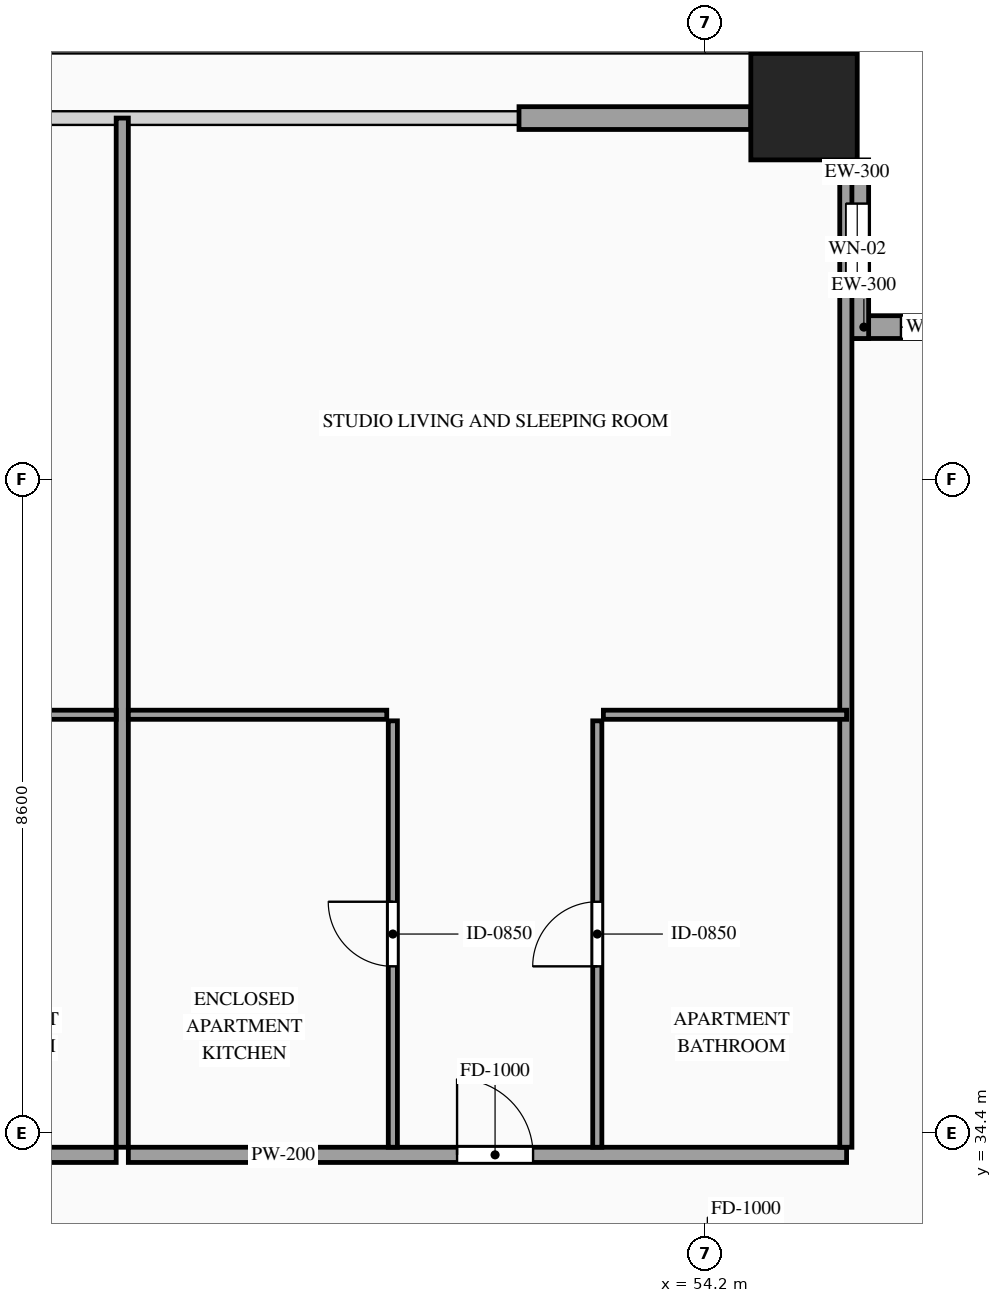
"""IFC4 building model, lengths in metres.
Left out: names, types, materials, properties, quantities, classifications, styles, units other than length and angle.
Written with IfcOpenShell. Run it as: python <this file> out.ifc"""

import sys

from ifc_helpers import new_model, si_unit, direction, frame, frame_2d, origin, origin_2d, place, context, subcontext, project, spatial, rectangle, hollow_rectangle, extrude, source, transform, mapped, element, fill, save


model = new_model("IFC4")
c1 = context("Model", 3, precision=1e-05, world=origin(), true_north=direction((0.0, 1.0)))
c2 = subcontext(c1, "Body", "Model", "MODEL_VIEW")
j1 = project(units=[si_unit("LENGTHUNIT", "METRE"), si_unit("PLANEANGLEUNIT", "RADIAN")], contexts=[c1])
p1 = place(None, origin())
s1 = spatial("IfcSite", under=j1, at=p1, CompositionType="ELEMENT")
p2 = place(p1, origin())
s2 = spatial("IfcBuilding", under=s1, at=p2, CompositionType="ELEMENT")
p3 = place(p2, frame((0.0, 0.0, 188.0)))
s3 = spatial("IfcBuildingStorey", under=s2, at=p3, CompositionType="ELEMENT", Elevation=188.0)
m1 = source(origin(), c2, "Body", "SweptSolid", [
    extrude(hollow_rectangle(XDim=1.4, YDim=1.4, WallThickness=0.06, at=origin_2d()), origin(), (0.0, 0.0, 1.0), 3.5),
])
p4 = place(p3, frame((55.5, 47.9, 0.0), z_axis=(0.0, 0.0, 1.0), x_axis=(1.0, 0.0, 0.0)))
e1 = element("IfcColumn", 1, at=p4, inside=s3, PredefinedType="COLUMN", context=c2, shape_type="MappedRepresentation", body=[
    mapped(m1, transform((0.0, 0.0, 0.0), scale=1.0)),
])
p5 = place(p3, frame((58.4, 45.0, 0.0), z_axis=(0.0, 0.0, 1.0), x_axis=(-1.0, 0.0, 0.0)))
e2 = element("IfcWall", 2, at=p5, inside=s3, PredefinedType="SOLIDWALL", context=c2, shape_type="SweptSolid", body=[
    extrude(rectangle(XDim=2.35, YDim=0.3, at=frame_2d((1.175, 0.0))), origin(), (0.0, 0.0, 1.0), 3.28),
])
p6 = place(p5, frame((0.725, 0.0, 0.85)))
e3 = element("IfcOpeningElement", 3, at=p6, cuts=e2, PredefinedType="OPENING", context=c2, shape_type="SweptSolid", body=[
    extrude(rectangle(XDim=0.9, YDim=1.5, at=frame_2d((0.45, 0.75))), frame((0.0, 0.165, 0.0), z_axis=(0.0, -1.0, 0.0), x_axis=(1.0, 0.0, 0.0)), (0.0, 0.0, 1.0), 0.33),
])
p7 = place(p3, frame((56.2, 44.85, 0.0), z_axis=(0.0, 0.0, 1.0), x_axis=(0.0, 1.0, 0.0)))
e4 = element("IfcWall", 4, at=p7, inside=s3, PredefinedType="SOLIDWALL", context=c2, shape_type="SweptSolid", body=[
    extrude(rectangle(XDim=2.35, YDim=0.3, at=frame_2d((1.175, 0.0))), origin(), (0.0, 0.0, 1.0), 3.28),
])
p8 = place(p7, frame((0.575, 0.0, 0.85)))
e5 = element("IfcOpeningElement", 5, at=p8, cuts=e4, PredefinedType="OPENING", context=c2, shape_type="SweptSolid", body=[
    extrude(rectangle(XDim=1.2, YDim=2.1, at=frame_2d((0.6, 1.05))), frame((0.0, 0.165, 0.0), z_axis=(0.0, -1.0, 0.0), x_axis=(1.0, 0.0, 0.0)), (0.0, 0.0, 1.0), 0.33),
])
m2 = source(origin(), c2, "Body", "SweptSolid", [
    extrude(rectangle(XDim=3.05, YDim=0.3, at=frame_2d((1.525, 0.0))), origin(), (0.0, 0.0, 1.0), 2.835),
])
p9 = place(p3, frame((51.75, 47.75, 0.0), z_axis=(0.0, 0.0, 1.0), x_axis=(1.0, 0.0, 0.0)))
e6 = element("IfcWall", 6, at=p9, inside=s3, PredefinedType="SOLIDWALL", context=c2, shape_type="MappedRepresentation", body=[
    mapped(m2, transform((0.0, 0.0, 0.0), scale=1.0)),
])
p10 = place(p3, frame((37.08, 34.11, 0.0), z_axis=(0.0, 0.0, 1.0), x_axis=(1.0, 0.0, 0.0)))
e7 = element("IfcWall", 7, at=p10, inside=s3, PredefinedType="PARTITIONING", context=c2, shape_type="SweptSolid", body=[
    extrude(rectangle(XDim=9.37, YDim=0.2, at=frame_2d((4.685, 0.0))), origin(), (0.0, 0.0, 1.0), 3.28),
])
p11 = place(p10, frame((4.282, 0.0, 0.0)))
e8 = element("IfcOpeningElement", 8, at=p11, cuts=e7, PredefinedType="OPENING", context=c2, shape_type="SweptSolid", body=[
    extrude(rectangle(XDim=1.0, YDim=2.2, at=frame_2d((0.5, 1.1))), frame((0.0, 0.115, 0.0), z_axis=(0.0, -1.0, 0.0), x_axis=(1.0, 0.0, 0.0)), (0.0, 0.0, 1.0), 0.23),
])
m3 = source(origin(), c2, "Body", "SweptSolid", [
    extrude(rectangle(XDim=13.54, YDim=0.16, at=frame_2d((6.77, 0.0))), origin(), (0.0, 0.0, 1.0), 3.28),
])
p12 = place(p3, frame((46.53, 34.21, 0.0), z_axis=(0.0, 0.0, 1.0), x_axis=(0.0, 1.0, 0.0)))
e9 = element("IfcWall", 9, at=p12, inside=s3, PredefinedType="PARTITIONING", context=c2, shape_type="MappedRepresentation", body=[
    mapped(m3, transform((0.0, 0.0, 0.0), scale=1.0)),
])
m4 = source(origin(), c2, "Body", "SweptSolid", [
    extrude(rectangle(XDim=3.2, YDim=0.12, at=frame_2d((1.6, 0.0))), origin(), (0.0, 0.0, 1.0), 2.875),
])
p13 = place(p3, frame((43.25, 39.9, 0.0), z_axis=(0.0, 0.0, 1.0), x_axis=(1.0, 0.0, 0.0)))
e10 = element("IfcWall", 10, at=p13, inside=s3, PredefinedType="PARTITIONING", context=c2, shape_type="MappedRepresentation", body=[
    mapped(m4, transform((0.0, 0.0, 0.0), scale=1.0)),
])
p14 = place(p3, frame((46.61, 34.11, 0.0), z_axis=(0.0, 0.0, 1.0), x_axis=(1.0, 0.0, 0.0)))
e11 = element("IfcWall", 11, at=p14, inside=s3, PredefinedType="PARTITIONING", context=c2, shape_type="SweptSolid", body=[
    extrude(rectangle(XDim=9.45, YDim=0.2, at=frame_2d((4.725, 0.0))), origin(), (0.0, 0.0, 1.0), 3.28),
])
p15 = place(p14, frame((4.325, 0.0, 0.0)))
e12 = element("IfcOpeningElement", 12, at=p15, cuts=e11, PredefinedType="OPENING", context=c2, shape_type="SweptSolid", body=[
    extrude(rectangle(XDim=1.0, YDim=2.2, at=frame_2d((0.5, 1.1))), frame((0.0, 0.115, 0.0), z_axis=(0.0, -1.0, 0.0), x_axis=(1.0, 0.0, 0.0)), (0.0, 0.0, 1.0), 0.23),
])
m5 = source(origin(), c2, "Body", "SweptSolid", [
    extrude(rectangle(XDim=13.39, YDim=0.16, at=frame_2d((6.695, 0.0))), origin(), (0.0, 0.0, 1.0), 3.28),
])
p16 = place(p3, frame((56.05, 34.21, 0.0), z_axis=(0.0, 0.0, 1.0), x_axis=(0.0, 1.0, 0.0)))
e13 = element("IfcWall", 13, at=p16, inside=s3, PredefinedType="PARTITIONING", context=c2, shape_type="MappedRepresentation", body=[
    mapped(m5, transform((0.0, 0.0, 0.0), scale=1.0)),
])
m6 = source(origin(), c2, "Body", "SweptSolid", [
    extrude(rectangle(XDim=3.4, YDim=0.12, at=frame_2d((1.7, 0.0))), origin(), (0.0, 0.0, 1.0), 2.875),
])
p17 = place(p3, frame((46.61, 39.9, 0.0), z_axis=(0.0, 0.0, 1.0), x_axis=(1.0, 0.0, 0.0)))
e14 = element("IfcWall", 14, at=p17, inside=s3, PredefinedType="PARTITIONING", context=c2, shape_type="MappedRepresentation", body=[
    mapped(m6, transform((0.0, 0.0, 0.0), scale=1.0)),
])
p18 = place(p3, frame((50.09, 34.21, 0.0), z_axis=(0.0, 0.0, 1.0), x_axis=(0.0, 1.0, 0.0)))
e15 = element("IfcWall", 15, at=p18, inside=s3, PredefinedType="PARTITIONING", context=c2, shape_type="SweptSolid", body=[
    extrude(rectangle(XDim=5.61, YDim=0.12, at=frame_2d((2.805, 0.0))), origin(), (0.0, 0.0, 1.0), 2.775),
])
p19 = place(p18, frame((2.38, 0.0, 0.0)))
e16 = element("IfcOpeningElement", 16, at=p19, cuts=e15, PredefinedType="OPENING", context=c2, shape_type="SweptSolid", body=[
    extrude(rectangle(XDim=0.85, YDim=2.1, at=frame_2d((0.425, 1.05))), frame((0.0, 0.075, 0.0), z_axis=(0.0, -1.0, 0.0), x_axis=(1.0, 0.0, 0.0)), (0.0, 0.0, 1.0), 0.15),
])
m7 = source(origin(), c2, "Body", "SweptSolid", [
    extrude(rectangle(XDim=3.2, YDim=0.12, at=frame_2d((1.6, 0.0))), origin(), (0.0, 0.0, 1.0), 3.28),
])
p20 = place(p3, frame((52.86, 39.9, 0.0), z_axis=(0.0, 0.0, 1.0), x_axis=(1.0, 0.0, 0.0)))
e17 = element("IfcWall", 17, at=p20, inside=s3, PredefinedType="PARTITIONING", context=c2, shape_type="MappedRepresentation", body=[
    mapped(m7, transform((0.0, 0.0, 0.0), scale=1.0)),
])
p21 = place(p3, frame((52.78, 34.21, 0.0), z_axis=(0.0, 0.0, 1.0), x_axis=(0.0, 1.0, 0.0)))
e18 = element("IfcWall", 18, at=p21, inside=s3, PredefinedType="PARTITIONING", context=c2, shape_type="SweptSolid", body=[
    extrude(rectangle(XDim=5.61, YDim=0.12, at=frame_2d((2.805, 0.0))), origin(), (0.0, 0.0, 1.0), 3.28),
])
p22 = place(p21, frame((2.38, 0.0, 0.0)))
e19 = element("IfcOpeningElement", 19, at=p22, cuts=e18, PredefinedType="OPENING", context=c2, shape_type="SweptSolid", body=[
    extrude(rectangle(XDim=0.85, YDim=2.1, at=frame_2d((0.425, 1.05))), frame((0.0, 0.075, 0.0), z_axis=(0.0, -1.0, 0.0), x_axis=(1.0, 0.0, 0.0)), (0.0, 0.0, 1.0), 0.15),
])
m8 = source(origin(), c2, "Body", "SweptSolid", [
    extrude(rectangle(XDim=0.9, YDim=1.5, at=frame_2d((0.45, 0.75))), frame((0.0, 0.03, 0.0), z_axis=(0.0, -1.0, 0.0), x_axis=(1.0, 0.0, 0.0)), (0.0, 0.0, 1.0), 0.06),
])
p23 = place(p6, origin())
e20 = element("IfcWindow", 20, at=p23, inside=s3, PartitioningType="SINGLE_PANEL", PredefinedType="WINDOW", context=c2, shape_type="MappedRepresentation", body=[
    mapped(m8, transform((0.0, 0.0, 0.0), scale=1.0)),
])
fill(e3, e20)
m9 = source(origin(), c2, "Body", "SweptSolid", [
    extrude(rectangle(XDim=1.2, YDim=2.1, at=frame_2d((0.6, 1.05))), frame((0.0, 0.03, 0.0), z_axis=(0.0, -1.0, 0.0), x_axis=(1.0, 0.0, 0.0)), (0.0, 0.0, 1.0), 0.06),
])
p24 = place(p8, origin())
e21 = element("IfcWindow", 21, at=p24, inside=s3, PartitioningType="SINGLE_PANEL", PredefinedType="WINDOW", context=c2, shape_type="MappedRepresentation", body=[
    mapped(m9, transform((0.0, 0.0, 0.0), scale=1.0)),
])
fill(e5, e21)
m10 = source(origin(), c2, "Body", "SweptSolid", [
    extrude(rectangle(XDim=1.0, YDim=2.2, at=frame_2d((0.5, 1.1))), frame((0.0, 0.025, 0.0), z_axis=(0.0, -1.0, 0.0), x_axis=(1.0, 0.0, 0.0)), (0.0, 0.0, 1.0), 0.05),
])
p25 = place(p15, origin())
e22 = element("IfcDoor", 22, at=p25, inside=s3, OperationType="SINGLE_SWING_LEFT", PredefinedType="DOOR", context=c2, shape_type="MappedRepresentation", body=[
    mapped(m10, transform((0.0, 0.0, 0.0), scale=1.0)),
])
fill(e12, e22)
m11 = source(origin(), c2, "Body", "SweptSolid", [
    extrude(rectangle(XDim=0.85, YDim=2.1, at=frame_2d((0.425, 1.05))), frame((0.0, 0.025, 0.0), z_axis=(0.0, -1.0, 0.0), x_axis=(1.0, 0.0, 0.0)), (0.0, 0.0, 1.0), 0.05),
])
p26 = place(p19, origin())
e23 = element("IfcDoor", 23, at=p26, inside=s3, OperationType="SINGLE_SWING_RIGHT", PredefinedType="DOOR", context=c2, shape_type="MappedRepresentation", body=[
    mapped(m11, transform((0.0, 0.0, 0.0), scale=1.0)),
])
fill(e16, e23)
p27 = place(p22, origin())
e24 = element("IfcDoor", 24, at=p27, inside=s3, OperationType="SINGLE_SWING_LEFT", PredefinedType="DOOR", context=c2, shape_type="MappedRepresentation", body=[
    mapped(m11, transform((0.0, 0.0, 0.0), scale=1.0)),
])
fill(e19, e24)
save(model, sys.argv[1])
